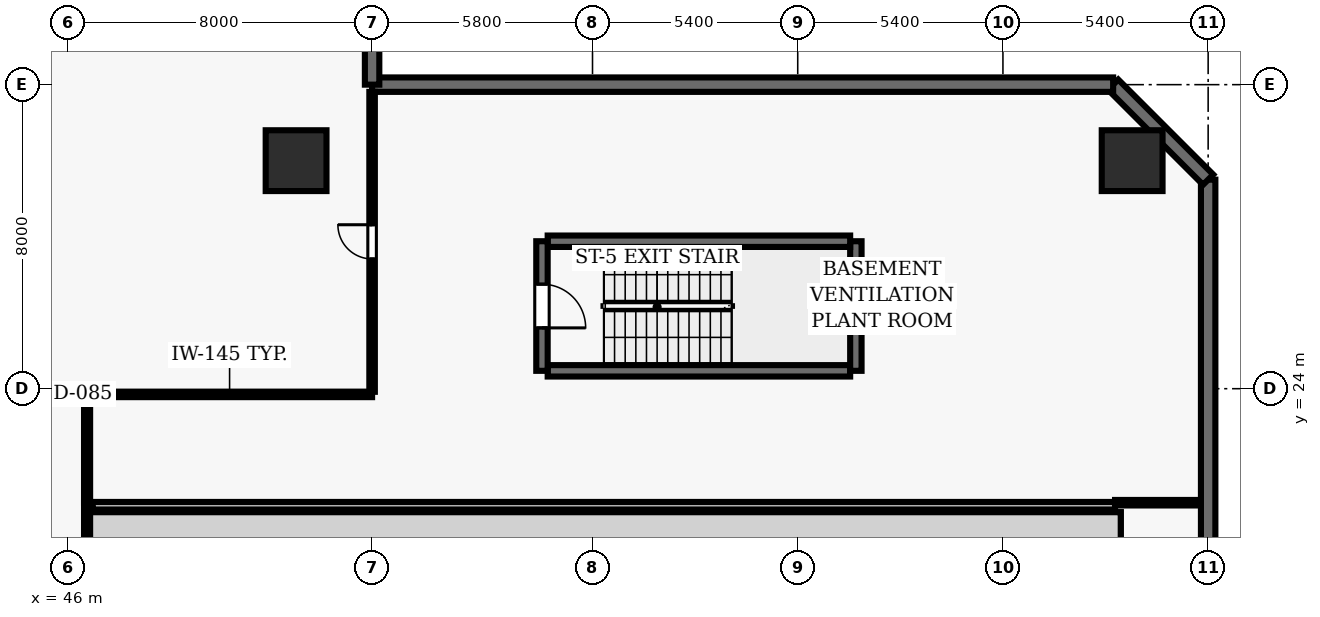
"""IFC4 building model, lengths in metres.
Left out: names, types, materials, properties, quantities, classifications, styles, units other than length and angle.
Written with IfcOpenShell. Run it as: python <this file> out.ifc"""

import sys

from ifc_helpers import new_model, si_unit, direction, frame, frame_2d, origin, origin_2d, place, context, subcontext, project, spatial, rectangle, extrude, element, fill, save


model = new_model("IFC4")
c1 = context("Model", 3, precision=1e-05, world=origin(), true_north=direction((0.0, 1.0)))
c2 = subcontext(c1, "Body", "Model", "MODEL_VIEW")
j1 = project(units=[si_unit("LENGTHUNIT", "METRE"), si_unit("PLANEANGLEUNIT", "RADIAN")], contexts=[c1])
p1 = place(None, origin())
s1 = spatial("IfcSite", under=j1, at=p1, CompositionType="ELEMENT")
p2 = place(p1, origin())
s2 = spatial("IfcBuilding", under=s1, at=p2, CompositionType="ELEMENT")
p3 = place(p2, frame((0.0, 0.0, -4.5)))
s3 = spatial("IfcBuildingStorey", under=s2, at=p3, CompositionType="ELEMENT", Elevation=-4.5)
for number, where, z_axis, x_axis in (
    (1, (52.0, 30.0, 0.0), (0.0, 0.0, 1.0), (1.0, 0.0, 0.0)),
    (2, (74.0, 30.0, 0.0), (0.0, 0.0, 1.0), (1.0, 0.0, 0.0)),
):
    element("IfcColumn", number, at=place(p3, frame(where, z_axis=z_axis, x_axis=x_axis)), inside=s3, PredefinedType="COLUMN", context=c2, shape_type="SweptSolid", body=[
        extrude(rectangle(XDim=1.6, YDim=1.6, at=origin_2d()), origin(), (0.0, 0.0, 1.0), 4.5),
    ])
p4 = place(p3, frame((76.0, 2.5, 0.0), z_axis=(0.0, 0.0, 1.0), x_axis=(0.0, 1.0, 0.0)))
e3 = element("IfcWall", 3, at=p4, inside=s3, PredefinedType="USERDEFINED", context=c2, shape_type="SweptSolid", body=[
    extrude(rectangle(XDim=27.0, YDim=0.38, at=frame_2d((13.5, 0.0))), origin(), (0.0, 0.0, 1.0), 4.22),
])
p5 = place(p3, frame((76.0, 29.5, 0.0), z_axis=(0.0, 0.0, 1.0), x_axis=(-0.707106781187, 0.707106781187, 0.0)))
e4 = element("IfcWall", 4, at=p5, inside=s3, PredefinedType="USERDEFINED", context=c2, shape_type="SweptSolid", body=[
    extrude(rectangle(XDim=3.536, YDim=0.38, at=frame_2d((1.768, 0.0))), origin(), (0.0, 0.0, 1.0), 4.22),
])
for number, where, z_axis, x_axis in (
    (5, (73.5, 32.0, 0.0), (0.0, 0.0, 1.0), (-1.0, 0.0, 0.0)),
    (6, (54.0, 32.0, 0.0), (0.0, 0.0, 1.0), (0.0, 1.0, 0.0)),
):
    element("IfcWall", number, at=place(p3, frame(where, z_axis=z_axis, x_axis=x_axis)), inside=s3, PredefinedType="USERDEFINED", context=c2, shape_type="SweptSolid", body=[
        extrude(rectangle(XDim=19.5, YDim=0.38, at=frame_2d((9.75, 0.0))), origin(), (0.0, 0.0, 1.0), 4.22),
    ])
p6 = place(p3, frame((58.62, 24.47, 0.0), z_axis=(0.0, 0.0, 1.0), x_axis=(1.0, 0.0, 0.0)))
e7 = element("IfcWall", 7, at=p6, inside=s3, PredefinedType="SHEAR", context=c2, shape_type="SweptSolid", body=[
    extrude(rectangle(XDim=7.96, YDim=0.3, at=frame_2d((3.98, 0.0))), origin(), (0.0, 0.0, 1.0), 4.22),
])
p7 = place(p3, frame((66.73, 24.47, 0.0), z_axis=(0.0, 0.0, 1.0), x_axis=(0.0, 1.0, 0.0)))
e8 = element("IfcWall", 8, at=p7, inside=s3, PredefinedType="SHEAR", context=c2, shape_type="SweptSolid", body=[
    extrude(rectangle(XDim=3.41, YDim=0.3, at=frame_2d((1.705, 0.0))), origin(), (0.0, 0.0, 1.0), 4.22),
])
p8 = place(p3, frame((66.58, 27.88, 0.0), z_axis=(0.0, 0.0, 1.0), x_axis=(-1.0, 0.0, 0.0)))
e9 = element("IfcWall", 9, at=p8, inside=s3, PredefinedType="SHEAR", context=c2, shape_type="SweptSolid", body=[
    extrude(rectangle(XDim=7.96, YDim=0.3, at=frame_2d((3.98, 0.0))), origin(), (0.0, 0.0, 1.0), 4.22),
])
p9 = place(p3, frame((58.47, 27.88, 0.0), z_axis=(0.0, 0.0, 1.0), x_axis=(0.0, -1.0, 0.0)))
e10 = element("IfcWall", 10, at=p9, inside=s3, PredefinedType="SHEAR", context=c2, shape_type="SweptSolid", body=[
    extrude(rectangle(XDim=3.41, YDim=0.3, at=frame_2d((1.705, 0.0))), origin(), (0.0, 0.0, 1.0), 4.22),
])
p10 = place(p9, frame((1.13, 0.0, 0.0)))
e11 = element("IfcOpeningElement", 11, at=p10, cuts=e10, PredefinedType="OPENING", context=c2, shape_type="SweptSolid", body=[
    extrude(rectangle(XDim=1.15, YDim=2.15, at=frame_2d((0.575, 1.075))), frame((0.0, 0.16, 0.0), z_axis=(0.0, -1.0, 0.0), x_axis=(1.0, 0.0, 0.0)), (0.0, 0.0, 1.0), 0.32),
])
p11 = place(p3, frame((46.65, 20.92, 0.0), z_axis=(0.0, 0.0, 1.0), x_axis=(1.0, 0.0, 0.0)))
e12 = element("IfcWall", 12, at=p11, inside=s3, PredefinedType="SOLIDWALL", context=c2, shape_type="SweptSolid", body=[
    extrude(rectangle(XDim=26.9, YDim=0.2, at=frame_2d((13.45, 0.0))), origin(), (0.0, 0.0, 1.0), 4.22),
])
p12 = place(p3, frame((40.35, 23.85, 0.0), z_axis=(0.0, 0.0, 1.0), x_axis=(1.0, 0.0, 0.0)))
e13 = element("IfcWall", 13, at=p12, inside=s3, PredefinedType="PARTITIONING", context=c2, shape_type="SweptSolid", body=[
    extrude(rectangle(XDim=6.15, YDim=0.16, at=frame_2d((3.075, 0.0))), origin(), (0.0, 0.0, 1.0), 4.22),
])
p13 = place(p12, frame((3.7, 0.0, 0.0)))
e14 = element("IfcOpeningElement", 14, at=p13, cuts=e13, PredefinedType="OPENING", context=c2, shape_type="SweptSolid", body=[
    extrude(rectangle(XDim=0.85, YDim=2.1, at=frame_2d((0.425, 1.05))), frame((0.0, 0.09, 0.0), z_axis=(0.0, -1.0, 0.0), x_axis=(1.0, 0.0, 0.0)), (0.0, 0.0, 1.0), 0.18),
])
p14 = place(p3, frame((46.5, 23.85, 0.0), z_axis=(0.0, 0.0, 1.0), x_axis=(1.0, 0.0, 0.0)))
e15 = element("IfcWall", 15, at=p14, inside=s3, PredefinedType="PARTITIONING", context=c2, shape_type="SweptSolid", body=[
    extrude(rectangle(XDim=7.5, YDim=0.145, at=frame_2d((3.75, 0.0))), origin(), (0.0, 0.0, 1.0), 4.22),
])
p15 = place(p3, frame((73.55, 21.0, 0.0), z_axis=(0.0, 0.0, 1.0), x_axis=(1.0, 0.0, 0.0)))
e16 = element("IfcWall", 16, at=p15, inside=s3, PredefinedType="PARTITIONING", context=c2, shape_type="SweptSolid", body=[
    extrude(rectangle(XDim=2.26, YDim=0.145, at=frame_2d((1.13, 0.0))), origin(), (0.0, 0.0, 1.0), 4.22),
])
p16 = place(p3, frame((46.5, 10.625, 0.0), z_axis=(0.0, 0.0, 1.0), x_axis=(0.0, 1.0, 0.0)))
e17 = element("IfcWall", 17, at=p16, inside=s3, PredefinedType="PARTITIONING", context=c2, shape_type="SweptSolid", body=[
    extrude(rectangle(XDim=10.375, YDim=0.16, at=frame_2d((5.188, 0.0))), origin(), (0.0, 0.0, 1.0), 3.365),
])
p17 = place(p3, frame((46.5, 21.0, 0.0), z_axis=(0.0, 0.0, 1.0), x_axis=(0.0, 1.0, 0.0)))
e18 = element("IfcWall", 18, at=p17, inside=s3, PredefinedType="PARTITIONING", context=c2, shape_type="SweptSolid", body=[
    extrude(rectangle(XDim=2.775, YDim=0.16, at=frame_2d((1.387, 0.0))), origin(), (0.0, 0.0, 1.0), 4.22),
])
p18 = place(p3, frame((54.0, 23.918, 0.0), z_axis=(0.0, 0.0, 1.0), x_axis=(0.0, 1.0, 0.0)))
e19 = element("IfcWall", 19, at=p18, inside=s3, PredefinedType="PARTITIONING", context=c2, shape_type="SweptSolid", body=[
    extrude(rectangle(XDim=7.892, YDim=0.145, at=frame_2d((3.946, 0.0))), origin(), (0.0, 0.0, 1.0), 4.22),
])
p19 = place(p18, frame((3.496, 0.0, 0.0)))
e20 = element("IfcOpeningElement", 20, at=p19, cuts=e19, PredefinedType="OPENING", context=c2, shape_type="SweptSolid", body=[
    extrude(rectangle(XDim=0.9, YDim=2.1, at=frame_2d((0.45, 1.05))), frame((0.0, 0.083, 0.0), z_axis=(0.0, -1.0, 0.0), x_axis=(1.0, 0.0, 0.0)), (0.0, 0.0, 1.0), 0.165),
])
p20 = place(p10, origin())
e21 = element("IfcDoor", 21, at=p20, inside=s3, OperationType="SINGLE_SWING_RIGHT", PredefinedType="DOOR", context=c2, shape_type="SweptSolid", body=[
    extrude(rectangle(XDim=1.15, YDim=2.15, at=frame_2d((0.575, 1.075))), frame((0.0, 0.025, 0.0), z_axis=(0.0, -1.0, 0.0), x_axis=(1.0, 0.0, 0.0)), (0.0, 0.0, 1.0), 0.05),
])
fill(e11, e21)
p21 = place(p19, origin())
e22 = element("IfcDoor", 22, at=p21, inside=s3, OperationType="SINGLE_SWING_RIGHT", PredefinedType="DOOR", context=c2, shape_type="SweptSolid", body=[
    extrude(rectangle(XDim=0.9, YDim=2.1, at=frame_2d((0.45, 1.05))), frame((0.0, 0.025, 0.0), z_axis=(0.0, -1.0, 0.0), x_axis=(1.0, 0.0, 0.0)), (0.0, 0.0, 1.0), 0.05),
])
fill(e20, e22)
save(model, sys.argv[1])
